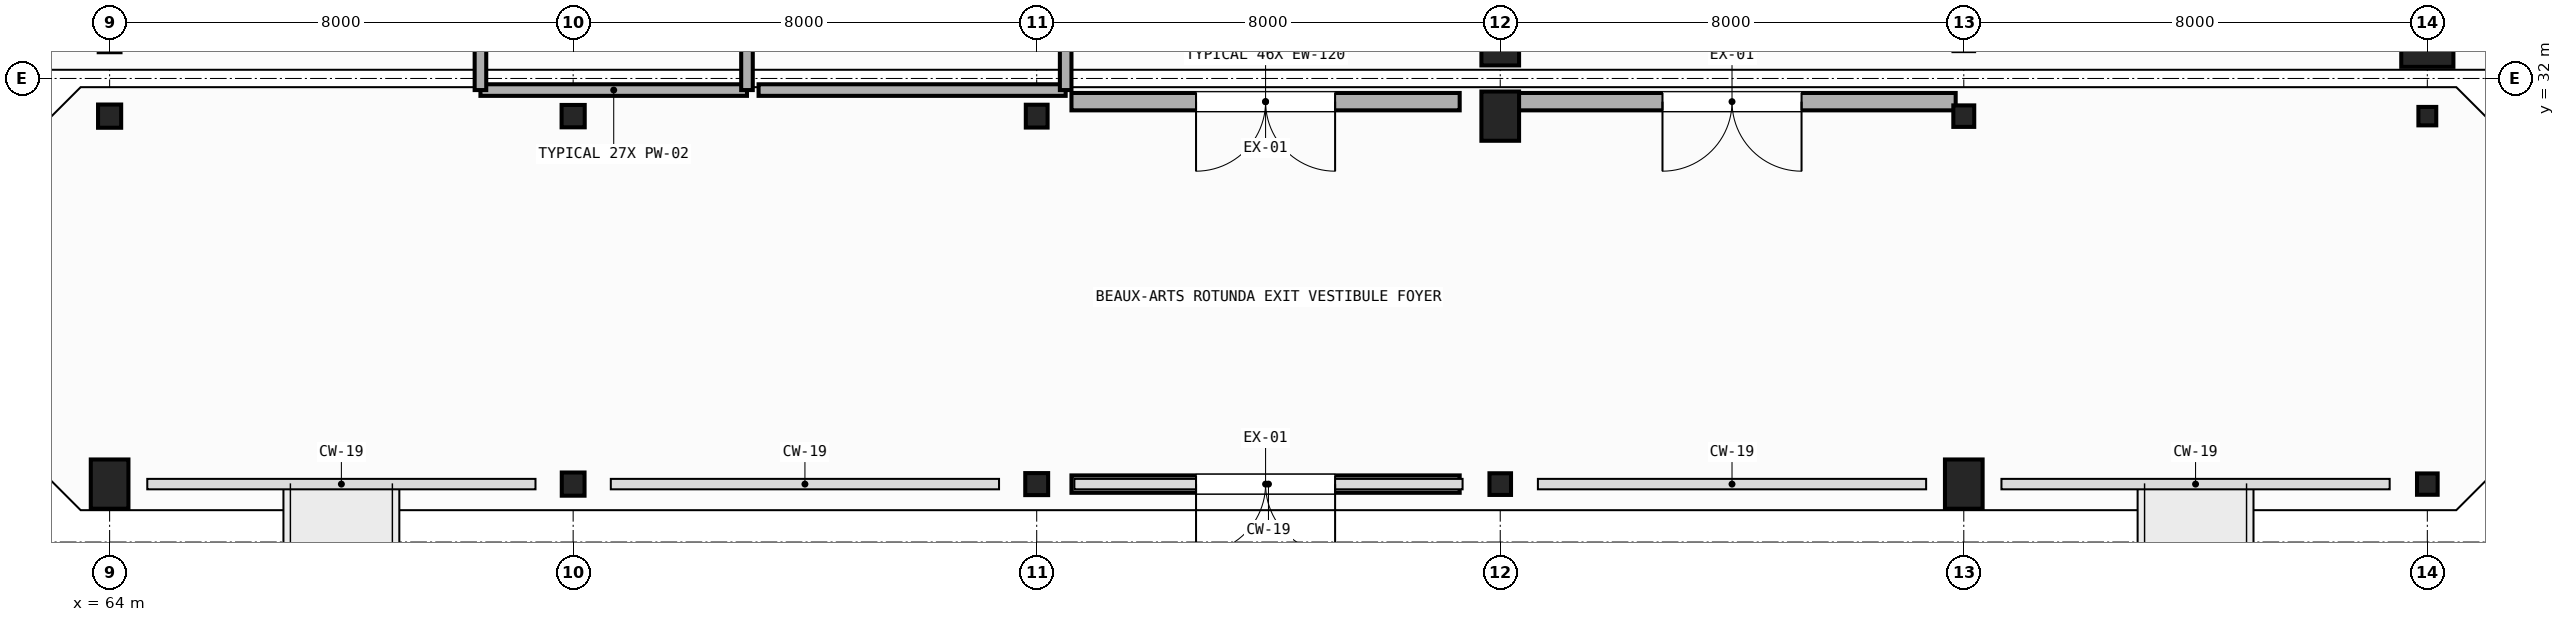
"""IFC4 building model, lengths in metres.
Left out: names, types, materials, properties, quantities, classifications, styles, units other than length and angle.
Written with IfcOpenShell. Run it as: python <this file> out.ifc"""

import sys

from ifc_helpers import new_model, si_unit, direction, frame, frame_2d, origin, origin_2d, place, context, subcontext, project, spatial, rectangle, i_section, extrude, element, fill, save


model = new_model("IFC4")
c1 = context("Model", 3, precision=1e-05, world=origin(), true_north=direction((0.0, 1.0)))
c2 = subcontext(c1, "Body", "Model", "MODEL_VIEW")
j1 = project(units=[si_unit("LENGTHUNIT", "METRE"), si_unit("PLANEANGLEUNIT", "RADIAN")], contexts=[c1])
p1 = place(None, origin())
s1 = spatial("IfcSite", under=j1, at=p1, CompositionType="ELEMENT")
p2 = place(p1, origin())
s2 = spatial("IfcBuilding", under=s1, at=p2, CompositionType="ELEMENT")
p3 = place(p2, origin())
s3 = spatial("IfcBuildingStorey", under=s2, at=p3, CompositionType="ELEMENT", Elevation=0.0)
p4 = place(p3, frame((88.0, 32.65, 0.0), z_axis=(0.0, 0.0, 1.0), x_axis=(1.0, 0.0, 0.0)))
e1 = element("IfcColumn", 1, at=p4, inside=s3, PredefinedType="PILASTER", context=c2, shape_type="SweptSolid", body=[
    extrude(rectangle(XDim=0.65, YDim=0.85, at=origin_2d()), origin(), (0.0, 0.0, 1.0), 5.08),
])
p5 = place(p3, frame((104.0, 32.65, 0.0), z_axis=(0.0, 0.0, 1.0), x_axis=(1.0, 0.0, 0.0)))
e2 = element("IfcColumn", 2, at=p5, inside=s3, PredefinedType="COLUMN", context=c2, shape_type="SweptSolid", body=[
    extrude(rectangle(XDim=0.9, YDim=0.9, at=origin_2d()), origin(), (0.0, 0.0, 1.0), 5.08),
])
p6 = place(p3, frame((64.0, 25.0, 0.0), z_axis=(0.0, 0.0, 1.0), x_axis=(1.0, 0.0, 0.0)))
e3 = element("IfcColumn", 3, at=p6, inside=s3, PredefinedType="PILASTER", context=c2, shape_type="SweptSolid", body=[
    extrude(rectangle(XDim=0.65, YDim=0.85, at=origin_2d()), origin(), (0.0, 0.0, 1.0), 5.12),
])
p7 = place(p3, frame((64.0, 31.35, 0.0), z_axis=(0.0, 0.0, 1.0), x_axis=(0.0, 1.0, 0.0)))
e4 = element("IfcColumn", 4, at=p7, inside=s3, PredefinedType="COLUMN", context=c2, shape_type="SweptSolid", body=[
    extrude(i_section(OverallWidth=0.401, OverallDepth=0.399, WebThickness=0.025, FlangeThickness=0.04, FilletRadius=0.015, at=origin_2d()), origin(), (0.0, 0.0, 1.0), 5.12),
])
p8 = place(p3, frame((72.0, 25.0, 0.0), z_axis=(0.0, 0.0, 1.0), x_axis=(0.0, 1.0, 0.0)))
e5 = element("IfcColumn", 5, at=p8, inside=s3, PredefinedType="COLUMN", context=c2, shape_type="SweptSolid", body=[
    extrude(i_section(OverallWidth=0.4, OverallDepth=0.393, WebThickness=0.023, FlangeThickness=0.037, FilletRadius=0.015, at=origin_2d()), origin(), (0.0, 0.0, 1.0), 5.12),
])
p9 = place(p3, frame((72.0, 31.35, 0.0), z_axis=(0.0, 0.0, 1.0), x_axis=(1.0, 0.0, 0.0)))
e6 = element("IfcColumn", 6, at=p9, inside=s3, PredefinedType="COLUMN", context=c2, shape_type="SweptSolid", body=[
    extrude(i_section(OverallWidth=0.399, OverallDepth=0.386, WebThickness=0.021, FlangeThickness=0.033, FilletRadius=0.015, at=origin_2d()), origin(), (0.0, 0.0, 1.0), 5.12),
])
p10 = place(p3, frame((80.0, 25.0, 0.0), z_axis=(0.0, 0.0, 1.0), x_axis=(1.0, 0.0, 0.0)))
e7 = element("IfcColumn", 7, at=p10, inside=s3, PredefinedType="COLUMN", context=c2, shape_type="SweptSolid", body=[
    extrude(i_section(OverallWidth=0.395, OverallDepth=0.38, WebThickness=0.019, FlangeThickness=0.03, FilletRadius=0.015, at=origin_2d()), origin(), (0.0, 0.0, 1.0), 5.12),
])
p11 = place(p3, frame((80.0, 31.35, 0.0), z_axis=(0.0, 0.0, 1.0), x_axis=(0.0, 1.0, 0.0)))
e8 = element("IfcColumn", 8, at=p11, inside=s3, PredefinedType="COLUMN", context=c2, shape_type="SweptSolid", body=[
    extrude(i_section(OverallWidth=0.394, OverallDepth=0.376, WebThickness=0.017, FlangeThickness=0.028, FilletRadius=0.015, at=origin_2d()), origin(), (0.0, 0.0, 1.0), 5.12),
])
p12 = place(p3, frame((88.0, 25.0, 0.0), z_axis=(0.0, 0.0, 1.0), x_axis=(0.0, 1.0, 0.0)))
e9 = element("IfcColumn", 9, at=p12, inside=s3, PredefinedType="COLUMN", context=c2, shape_type="SweptSolid", body=[
    extrude(i_section(OverallWidth=0.374, OverallDepth=0.372, WebThickness=0.016, FlangeThickness=0.026, FilletRadius=0.015, at=origin_2d()), origin(), (0.0, 0.0, 1.0), 5.12),
])
for number, where, z_axis, x_axis in (
    (10, (88.0, 31.35, 0.0), (0.0, 0.0, 1.0), (1.0, 0.0, 0.0)),
    (11, (96.0, 25.0, 0.0), (0.0, 0.0, 1.0), (1.0, 0.0, 0.0)),
):
    element("IfcColumn", number, at=place(p3, frame(where, z_axis=z_axis, x_axis=x_axis)), inside=s3, PredefinedType="PILASTER", context=c2, shape_type="SweptSolid", body=[
        extrude(rectangle(XDim=0.65, YDim=0.85, at=origin_2d()), origin(), (0.0, 0.0, 1.0), 5.12),
    ])
p13 = place(p3, frame((96.0, 31.35, 0.0), z_axis=(0.0, 0.0, 1.0), x_axis=(0.0, 1.0, 0.0)))
e12 = element("IfcColumn", 12, at=p13, inside=s3, PredefinedType="COLUMN", context=c2, shape_type="SweptSolid", body=[
    extrude(i_section(OverallWidth=0.371, OverallDepth=0.361, WebThickness=0.012, FlangeThickness=0.02, FilletRadius=0.015, at=origin_2d()), origin(), (0.0, 0.0, 1.0), 5.12),
])
p14 = place(p3, frame((104.0, 25.0, 0.0), z_axis=(0.0, 0.0, 1.0), x_axis=(0.0, 1.0, 0.0)))
e13 = element("IfcColumn", 13, at=p14, inside=s3, PredefinedType="COLUMN", context=c2, shape_type="SweptSolid", body=[
    extrude(i_section(OverallWidth=0.368, OverallDepth=0.356, WebThickness=0.011, FlangeThickness=0.018, FilletRadius=0.015, at=origin_2d()), origin(), (0.0, 0.0, 1.0), 5.12),
])
p15 = place(p3, frame((104.0, 31.35, 0.0), z_axis=(0.0, 0.0, 1.0), x_axis=(1.0, 0.0, 0.0)))
e14 = element("IfcColumn", 14, at=p15, inside=s3, PredefinedType="COLUMN", context=c2, shape_type="SweptSolid", body=[
    extrude(i_section(OverallWidth=0.308, OverallDepth=0.318, WebThickness=0.013, FlangeThickness=0.021, FilletRadius=0.013, at=origin_2d()), origin(), (0.0, 0.0, 1.0), 5.12),
])
p16 = place(p3, frame((87.3, 31.6, 0.0), z_axis=(0.0, 0.0, 1.0), x_axis=(-1.0, 0.0, 0.0)))
e15 = element("IfcWall", 15, at=p16, inside=s3, PredefinedType="STANDARD", context=c2, shape_type="SweptSolid", body=[
    extrude(rectangle(XDim=6.7, YDim=0.3, at=frame_2d((3.35, 0.0))), origin(), (0.0, 0.0, 1.0), 4.28),
])
p17 = place(p16, frame((2.15, 0.0, 0.0)))
e16 = element("IfcOpeningElement", 16, at=p17, cuts=e15, PredefinedType="OPENING", context=c2, shape_type="SweptSolid", body=[
    extrude(rectangle(XDim=2.4, YDim=2.7, at=frame_2d((1.2, 1.35))), frame((0.0, 0.16, 0.0), z_axis=(0.0, -1.0, 0.0), x_axis=(1.0, 0.0, 0.0)), (0.0, 0.0, 1.0), 0.32),
])
p18 = place(p3, frame((95.86, 31.6, 0.0), z_axis=(0.0, 0.0, 1.0), x_axis=(-1.0, 0.0, 0.0)))
e17 = element("IfcWall", 17, at=p18, inside=s3, PredefinedType="STANDARD", context=c2, shape_type="SweptSolid", body=[
    extrude(rectangle(XDim=7.72, YDim=0.3, at=frame_2d((3.86, 0.0))), origin(), (0.0, 0.0, 1.0), 4.28),
])
p19 = place(p18, frame((2.66, 0.0, 0.0)))
e18 = element("IfcOpeningElement", 18, at=p19, cuts=e17, PredefinedType="OPENING", context=c2, shape_type="SweptSolid", body=[
    extrude(rectangle(XDim=2.4, YDim=2.7, at=frame_2d((1.2, 1.35))), frame((0.0, 0.16, 0.0), z_axis=(0.0, -1.0, 0.0), x_axis=(1.0, 0.0, 0.0)), (0.0, 0.0, 1.0), 0.32),
])
p20 = place(p3, frame((87.3, 25.0, 0.0), z_axis=(0.0, 0.0, 1.0), x_axis=(-1.0, 0.0, 0.0)))
e19 = element("IfcWall", 19, at=p20, inside=s3, PredefinedType="STANDARD", context=c2, shape_type="SweptSolid", body=[
    extrude(rectangle(XDim=6.7, YDim=0.3, at=frame_2d((3.35, 0.0))), origin(), (0.0, 0.0, 1.0), 4.621),
])
p21 = place(p20, frame((2.15, 0.0, 0.0)))
e20 = element("IfcOpeningElement", 20, at=p21, cuts=e19, PredefinedType="OPENING", context=c2, shape_type="SweptSolid", body=[
    extrude(rectangle(XDim=2.4, YDim=2.7, at=frame_2d((1.2, 1.35))), frame((0.0, 0.16, 0.0), z_axis=(0.0, -1.0, 0.0), x_axis=(1.0, 0.0, 0.0)), (0.0, 0.0, 1.0), 0.32),
])
p22 = place(p3, frame((70.4, 31.8, 0.0), z_axis=(0.0, 0.0, 1.0), x_axis=(1.0, 0.0, 0.0)))
e21 = element("IfcWall", 21, at=p22, inside=s3, PredefinedType="PLUMBINGWALL", context=c2, shape_type="SweptSolid", body=[
    extrude(rectangle(XDim=4.6, YDim=0.2, at=frame_2d((2.3, 0.0))), origin(), (0.0, 0.0, 1.0), 4.29),
])
for number, where, z_axis, x_axis in (
    (22, (70.4, 31.8, 0.0), (0.0, 0.0, 1.0), (0.0, 1.0, 0.0)),
    (23, (75.0, 31.8, 0.0), (0.0, 0.0, 1.0), (0.0, 1.0, 0.0)),
):
    element("IfcWall", number, at=place(p3, frame(where, z_axis=z_axis, x_axis=x_axis)), inside=s3, PredefinedType="PLUMBINGWALL", context=c2, shape_type="SweptSolid", body=[
        extrude(rectangle(XDim=10.4, YDim=0.2, at=frame_2d((5.2, 0.0))), origin(), (0.0, 0.0, 1.0), 4.29),
    ])
p23 = place(p3, frame((75.2, 31.8, 0.0), z_axis=(0.0, 0.0, 1.0), x_axis=(1.0, 0.0, 0.0)))
e24 = element("IfcWall", 24, at=p23, inside=s3, PredefinedType="PLUMBINGWALL", context=c2, shape_type="SweptSolid", body=[
    extrude(rectangle(XDim=5.3, YDim=0.2, at=frame_2d((2.65, 0.0))), origin(), (0.0, 0.0, 1.0), 4.29),
])
p24 = place(p3, frame((80.5, 31.8, 0.0), z_axis=(0.0, 0.0, 1.0), x_axis=(0.0, 1.0, 0.0)))
e25 = element("IfcWall", 25, at=p24, inside=s3, PredefinedType="PLUMBINGWALL", context=c2, shape_type="SweptSolid", body=[
    extrude(rectangle(XDim=10.4, YDim=0.2, at=frame_2d((5.2, 0.0))), origin(), (0.0, 0.0, 1.0), 4.24),
])
p25 = place(p17, origin())
e26 = element("IfcDoor", 26, at=p25, inside=s3, OperationType="DOUBLE_DOOR_SINGLE_SWING", PredefinedType="DOOR", context=c2, shape_type="SweptSolid", body=[
    extrude(rectangle(XDim=2.4, YDim=2.7, at=frame_2d((1.2, 1.35))), frame((0.0, 0.025, 0.0), z_axis=(0.0, -1.0, 0.0), x_axis=(1.0, 0.0, 0.0)), (0.0, 0.0, 1.0), 0.05),
])
fill(e16, e26)
p26 = place(p19, origin())
e27 = element("IfcDoor", 27, at=p26, inside=s3, OperationType="DOUBLE_DOOR_SINGLE_SWING", PredefinedType="DOOR", context=c2, shape_type="SweptSolid", body=[
    extrude(rectangle(XDim=2.4, YDim=2.7, at=frame_2d((1.2, 1.35))), frame((0.0, 0.025, 0.0), z_axis=(0.0, -1.0, 0.0), x_axis=(1.0, 0.0, 0.0)), (0.0, 0.0, 1.0), 0.05),
])
fill(e18, e27)
p27 = place(p21, origin())
e28 = element("IfcDoor", 28, at=p27, inside=s3, OperationType="DOUBLE_DOOR_SINGLE_SWING", PredefinedType="DOOR", context=c2, shape_type="SweptSolid", body=[
    extrude(rectangle(XDim=2.4, YDim=2.7, at=frame_2d((1.2, 1.35))), frame((0.0, 0.025, 0.0), z_axis=(0.0, -1.0, 0.0), x_axis=(1.0, 0.0, 0.0)), (0.0, 0.0, 1.0), 0.05),
])
fill(e20, e28)
save(model, sys.argv[1])
